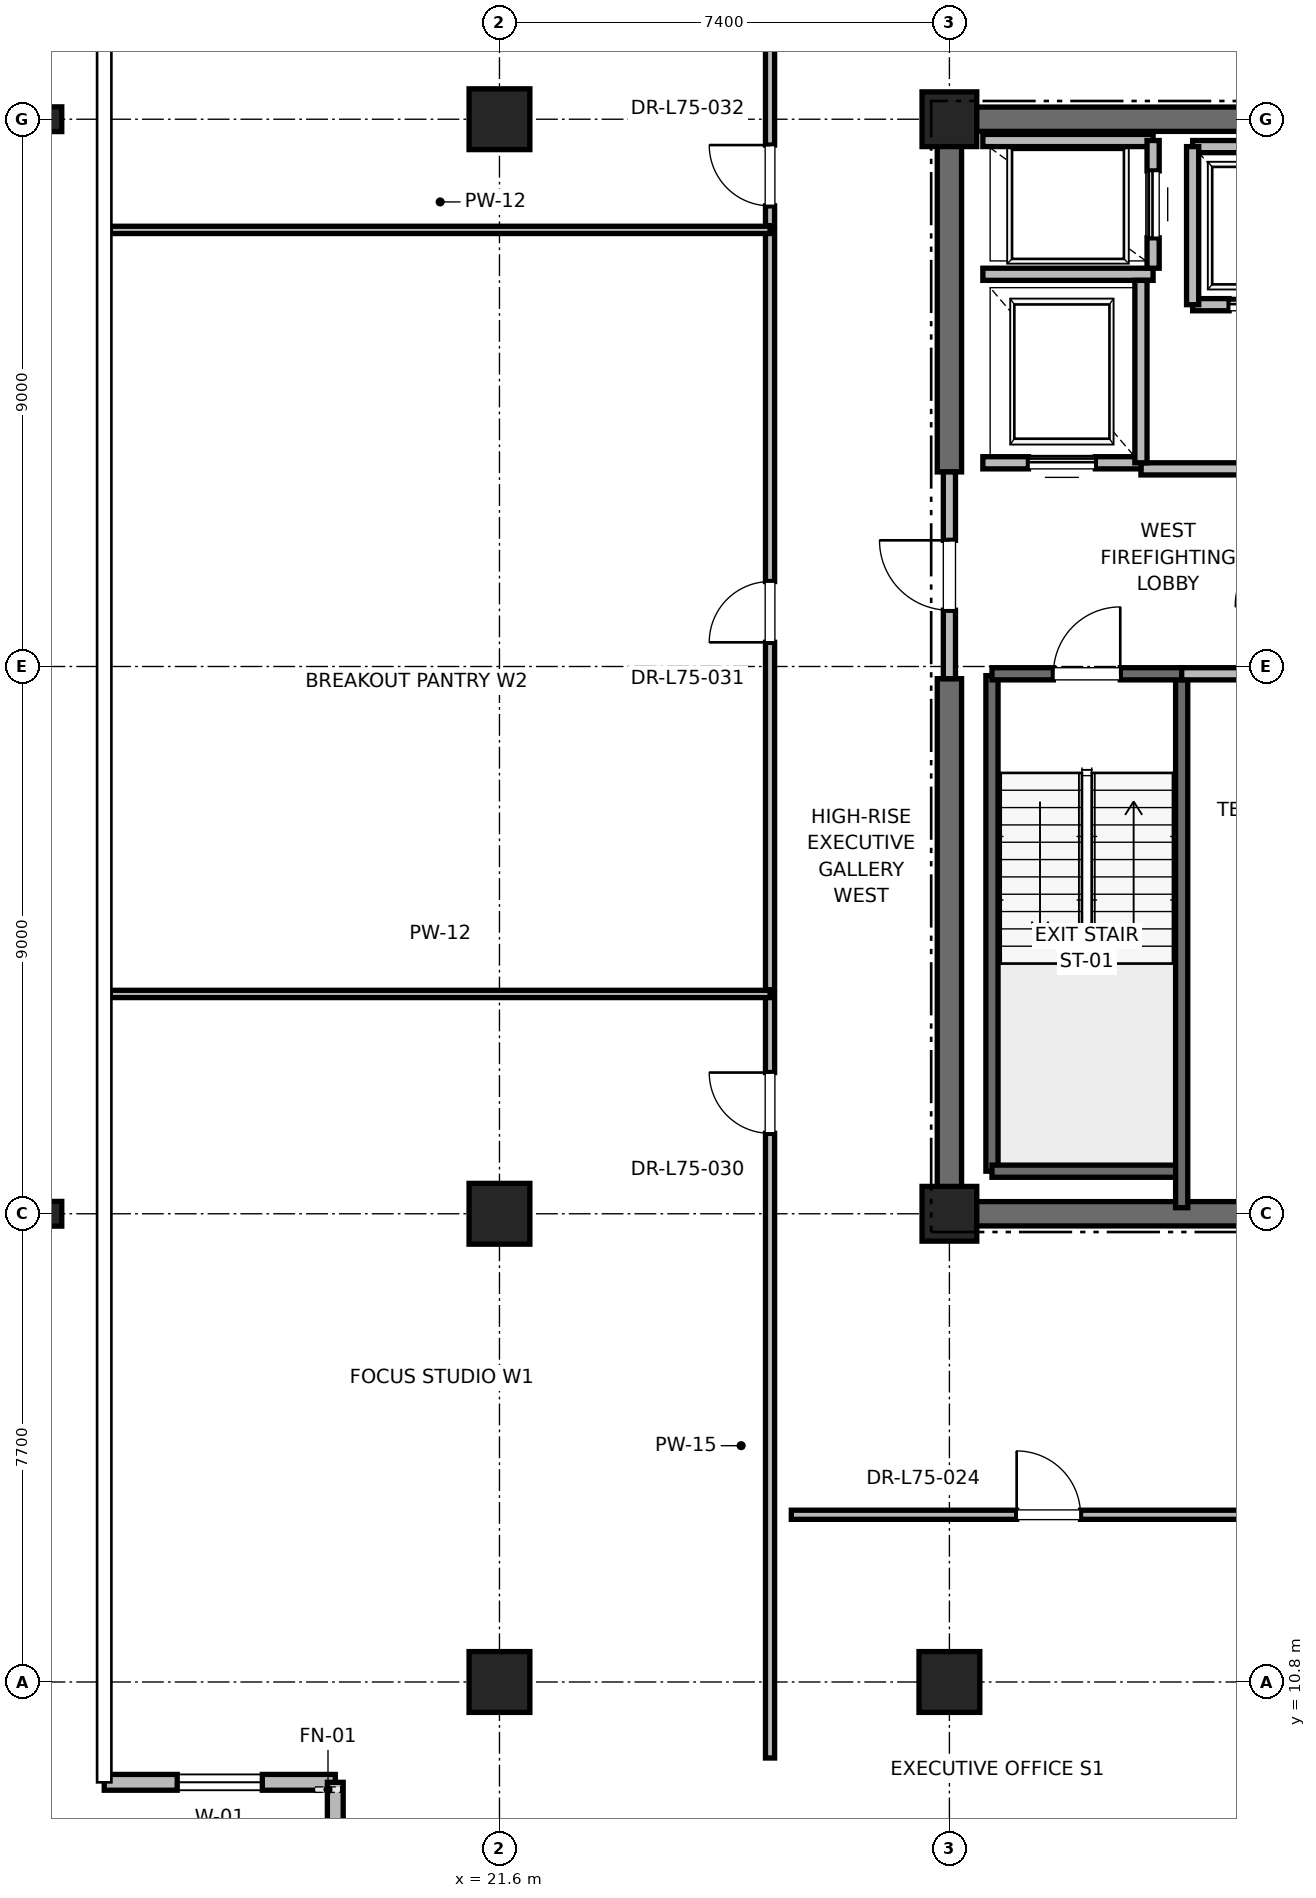
"""IFC4 building model, lengths in metres.
Left out: names, types, materials, properties, quantities, classifications, styles, units other than length and angle.
Written with IfcOpenShell. Run it as: python <this file> out.ifc"""

import sys

from ifc_helpers import new_model, si_unit, direction, frame, frame_2d, origin, origin_2d, place, context, subcontext, project, spatial, rectangle, i_section, extrude, element, fill, save


model = new_model("IFC4")
c1 = context("Model", 3, precision=1e-05, world=origin(), true_north=direction((0.0, 1.0)))
c2 = subcontext(c1, "Body", "Model", "MODEL_VIEW")
j1 = project(units=[si_unit("LENGTHUNIT", "METRE"), si_unit("PLANEANGLEUNIT", "RADIAN")], contexts=[c1])
p1 = place(None, origin())
s1 = spatial("IfcSite", under=j1, at=p1, CompositionType="ELEMENT")
p2 = place(p1, origin())
s2 = spatial("IfcBuilding", under=s1, at=p2, CompositionType="ELEMENT")
p3 = place(p2, frame((0.0, 0.0, 322.8)))
s3 = spatial("IfcBuildingStorey", under=s2, at=p3, CompositionType="ELEMENT", Elevation=322.8)
for number, where, z_axis, x_axis in (
    (1, (29.0, 10.8, 0.0), (0.0, 0.0, 1.0), (1.0, 0.0, 0.0)),
    (2, (21.6, 18.5, 0.0), (0.0, 0.0, 1.0), (1.0, 0.0, 0.0)),
    (3, (21.6, 36.5, 0.0), (0.0, 0.0, 1.0), (1.0, 0.0, 0.0)),
    (4, (21.6, 10.8, 0.0), (0.0, 0.0, 1.0), (1.0, 0.0, 0.0)),
):
    element("IfcColumn", number, at=place(p3, frame(where, z_axis=z_axis, x_axis=x_axis)), inside=s3, PredefinedType="COLUMN", context=c2, shape_type="SweptSolid", body=[
        extrude(rectangle(XDim=1.0, YDim=1.0, at=origin_2d()), origin(), (0.0, 0.0, 1.0), 4.0),
    ])
for number, where, z_axis, x_axis in (
    (5, (14.2, 18.5, 0.0), (0.0, 0.0, 1.0), (1.0, 0.0, 0.0)),
    (6, (14.2, 36.5, 0.0), (0.0, 0.0, 1.0), (1.0, 0.0, 0.0)),
):
    element("IfcColumn", number, at=place(p3, frame(where, z_axis=z_axis, x_axis=x_axis)), inside=s3, PredefinedType="COLUMN", context=c2, shape_type="SweptSolid", body=[
        extrude(i_section(OverallWidth=0.403, OverallDepth=0.406, WebThickness=0.027, FlangeThickness=0.043, FilletRadius=0.015, at=origin_2d()), origin(), (0.0, 0.0, 1.0), 4.0),
    ])
for number, where, z_axis, x_axis in (
    (7, (29.0, 18.5, 0.0), (0.0, 0.0, 1.0), (1.0, 0.0, 0.0)),
    (8, (29.0, 36.5, 0.0), (0.0, 0.0, 1.0), (1.0, 0.0, 0.0)),
):
    element("IfcColumn", number, at=place(p3, frame(where, z_axis=z_axis, x_axis=x_axis)), inside=s3, PredefinedType="PILASTER", context=c2, shape_type="SweptSolid", body=[
        extrude(rectangle(XDim=0.9, YDim=0.9, at=origin_2d()), origin(), (0.0, 0.0, 1.0), 4.0),
    ])
p4 = place(p3, frame((29.0, 18.5, 0.0), z_axis=(0.0, 0.0, 1.0), x_axis=(1.0, 0.0, 0.0)))
e9 = element("IfcWall", 9, at=p4, inside=s3, PredefinedType="SHEAR", context=c2, shape_type="SweptSolid", body=[
    extrude(rectangle(XDim=9.2, YDim=0.4, at=frame_2d((4.6, 0.0))), origin(), (0.0, 0.0, 1.0), 3.785),
])
p5 = place(p3, frame((29.0, 36.5, 0.0), z_axis=(0.0, 0.0, 1.0), x_axis=(1.0, 0.0, 0.0)))
e10 = element("IfcWall", 10, at=p5, inside=s3, PredefinedType="SHEAR", context=c2, shape_type="SweptSolid", body=[
    extrude(rectangle(XDim=5.8, YDim=0.4, at=frame_2d((2.9, 0.0))), origin(), (0.0, 0.0, 1.0), 3.785),
])
p6 = place(p3, frame((29.0, 18.5, 0.0), z_axis=(0.0, 0.0, 1.0), x_axis=(0.0, 1.0, 0.0)))
e11 = element("IfcWall", 11, at=p6, inside=s3, PredefinedType="SHEAR", context=c2, shape_type="SweptSolid", body=[
    extrude(rectangle(XDim=8.8, YDim=0.4, at=frame_2d((4.4, 0.0))), origin(), (0.0, 0.0, 1.0), 3.785),
])
p7 = place(p3, frame((29.0, 30.7, 0.0), z_axis=(0.0, 0.0, 1.0), x_axis=(0.0, 1.0, 0.0)))
e12 = element("IfcWall", 12, at=p7, inside=s3, PredefinedType="SHEAR", context=c2, shape_type="SweptSolid", body=[
    extrude(rectangle(XDim=5.8, YDim=0.4, at=frame_2d((2.9, 0.0))), origin(), (0.0, 0.0, 1.0), 3.785),
])
p8 = place(p3, frame((15.1, 9.15, 0.0), z_axis=(0.0, 0.0, 1.0), x_axis=(1.0, 0.0, 0.0)))
e13 = element("IfcWall", 13, at=p8, inside=s3, PredefinedType="PARAPET", context=c2, shape_type="SweptSolid", body=[
    extrude(rectangle(XDim=3.8, YDim=0.26, at=frame_2d((1.9, 0.0))), origin(), (0.0, 0.0, 1.0), 3.785),
])
p9 = place(p8, frame((1.2, 0.0, 0.85)))
e14 = element("IfcOpeningElement", 14, at=p9, cuts=e13, PredefinedType="OPENING", context=c2, shape_type="SweptSolid", body=[
    extrude(rectangle(XDim=1.4, YDim=2.0, at=frame_2d((0.7, 1.0))), frame((0.0, 0.13, 0.0), z_axis=(0.0, -1.0, 0.0), x_axis=(1.0, 0.0, 0.0)), (0.0, 0.0, 1.0), 0.26),
])
p10 = place(p3, frame((18.9, 9.15, 0.0), z_axis=(0.0, 0.0, 1.0), x_axis=(0.0, -1.0, 0.0)))
e15 = element("IfcWall", 15, at=p10, inside=s3, PredefinedType="PARAPET", context=c2, shape_type="SweptSolid", body=[
    extrude(rectangle(XDim=3.3, YDim=0.26, at=frame_2d((1.65, 0.0))), origin(), (0.0, 0.0, 1.0), 3.785),
])
p11 = place(p3, frame((29.7, 19.2, 0.0), z_axis=(0.0, 0.0, 1.0), x_axis=(0.0, 1.0, 0.0)))
e16 = element("IfcWall", 16, at=p11, inside=s3, PredefinedType="SOLIDWALL", context=c2, shape_type="SweptSolid", body=[
    extrude(rectangle(XDim=8.15, YDim=0.2, at=frame_2d((4.075, 0.0))), origin(), (0.0, 0.0, 1.0), 3.785),
])
p12 = place(p3, frame((29.7, 19.2, 0.0), z_axis=(0.0, 0.0, 1.0), x_axis=(1.0, 0.0, 0.0)))
e17 = element("IfcWall", 17, at=p12, inside=s3, PredefinedType="SOLIDWALL", context=c2, shape_type="SweptSolid", body=[
    extrude(rectangle(XDim=3.12, YDim=0.2, at=frame_2d((1.56, 0.0))), origin(), (0.0, 0.0, 1.0), 3.785),
])
p13 = place(p3, frame((32.82, 18.6, 0.0), z_axis=(0.0, 0.0, 1.0), x_axis=(0.0, 1.0, 0.0)))
e18 = element("IfcWall", 18, at=p13, inside=s3, PredefinedType="SOLIDWALL", context=c2, shape_type="SweptSolid", body=[
    extrude(rectangle(XDim=8.78, YDim=0.2, at=frame_2d((4.39, 0.0))), origin(), (0.0, 0.0, 1.0), 3.785),
])
p14 = place(p3, frame((29.7, 27.38, 0.0), z_axis=(0.0, 0.0, 1.0), x_axis=(1.0, 0.0, 0.0)))
e19 = element("IfcWall", 19, at=p14, inside=s3, PredefinedType="SOLIDWALL", context=c2, shape_type="SweptSolid", body=[
    extrude(rectangle(XDim=3.12, YDim=0.2, at=frame_2d((1.56, 0.0))), origin(), (0.0, 0.0, 1.0), 3.785),
])
p15 = place(p14, frame((1.01, 0.0, 0.0)))
e20 = element("IfcOpeningElement", 20, at=p15, cuts=e19, PredefinedType="OPENING", context=c2, shape_type="SweptSolid", body=[
    extrude(rectangle(XDim=1.1, YDim=2.15, at=frame_2d((0.55, 1.075))), frame((0.0, 0.1, 0.0), z_axis=(0.0, -1.0, 0.0), x_axis=(1.0, 0.0, 0.0)), (0.0, 0.0, 1.0), 0.2),
])
p16 = place(p3, frame((29.0, 27.3, 0.0), z_axis=(0.0, 0.0, 1.0), x_axis=(0.0, 1.0, 0.0)))
e21 = element("IfcWall", 21, at=p16, inside=s3, PredefinedType="PARTITIONING", context=c2, shape_type="SweptSolid", body=[
    extrude(rectangle(XDim=3.4, YDim=0.2, at=frame_2d((1.7, 0.0))), origin(), (0.0, 0.0, 1.0), 2.865),
])
p17 = place(p16, frame((1.125, 0.0, 0.0)))
e22 = element("IfcOpeningElement", 22, at=p17, cuts=e21, PredefinedType="OPENING", context=c2, shape_type="SweptSolid", body=[
    extrude(rectangle(XDim=1.15, YDim=2.2, at=frame_2d((0.575, 1.1))), frame((0.0, 0.1, 0.0), z_axis=(0.0, -1.0, 0.0), x_axis=(1.0, 0.0, 0.0)), (0.0, 0.0, 1.0), 0.2),
])
p18 = place(p3, frame((32.82, 27.38, 0.0), z_axis=(0.0, 0.0, 1.0), x_axis=(1.0, 0.0, 0.0)))
e23 = element("IfcWall", 23, at=p18, inside=s3, PredefinedType="PARTITIONING", context=c2, shape_type="SweptSolid", body=[
    extrude(rectangle(XDim=5.62, YDim=0.2, at=frame_2d((2.81, 0.0))), origin(), (0.0, 0.0, 1.0), 3.785),
])
p19 = place(p3, frame((32.15, 30.75, 0.0), z_axis=(0.0, 0.0, 1.0), x_axis=(1.0, 0.0, 0.0)))
e24 = element("IfcWall", 24, at=p19, inside=s3, PredefinedType="PARTITIONING", context=c2, shape_type="SweptSolid", body=[
    extrude(rectangle(XDim=2.7, YDim=0.2, at=frame_2d((1.35, 0.0))), origin(), (0.0, 0.0, 1.0), 3.785),
])
p20 = place(p3, frame((29.55, 30.85, 0.0), z_axis=(0.0, 0.0, 1.0), x_axis=(1.0, 0.0, 0.0)))
e25 = element("IfcWall", 25, at=p20, inside=s3, PredefinedType="SOLIDWALL", context=c2, shape_type="SweptSolid", body=[
    extrude(rectangle(XDim=2.6, YDim=0.2, at=frame_2d((1.3, 0.0))), origin(), (0.0, 0.0, 1.0), 2.865),
])
p21 = place(p20, frame((0.75, 0.0, 0.0)))
e26 = element("IfcOpeningElement", 26, at=p21, cuts=e25, PredefinedType="OPENING", context=c2, shape_type="SweptSolid", body=[
    extrude(rectangle(XDim=1.1, YDim=2.2, at=frame_2d((0.55, 1.1))), frame((0.0, 0.1, 0.0), z_axis=(0.0, -1.0, 0.0), x_axis=(1.0, 0.0, 0.0)), (0.0, 0.0, 1.0), 0.2),
])
p22 = place(p3, frame((29.55, 33.95, 0.0), z_axis=(0.0, 0.0, 1.0), x_axis=(1.0, 0.0, 0.0)))
e27 = element("IfcWall", 27, at=p22, inside=s3, PredefinedType="SOLIDWALL", context=c2, shape_type="SweptSolid", body=[
    extrude(rectangle(XDim=2.8, YDim=0.2, at=frame_2d((1.4, 0.0))), origin(), (0.0, 0.0, 1.0), 3.785),
])
p23 = place(p3, frame((32.15, 30.85, 0.0), z_axis=(0.0, 0.0, 1.0), x_axis=(0.0, 1.0, 0.0)))
e28 = element("IfcWall", 28, at=p23, inside=s3, PredefinedType="SOLIDWALL", context=c2, shape_type="SweptSolid", body=[
    extrude(rectangle(XDim=3.0, YDim=0.2, at=frame_2d((1.5, 0.0))), origin(), (0.0, 0.0, 1.0), 3.785),
])
p24 = place(p3, frame((32.35, 36.15, 0.0), z_axis=(0.0, 0.0, 1.0), x_axis=(-1.0, 0.0, 0.0)))
e29 = element("IfcWall", 29, at=p24, inside=s3, PredefinedType="SOLIDWALL", context=c2, shape_type="SweptSolid", body=[
    extrude(rectangle(XDim=2.8, YDim=0.2, at=frame_2d((1.4, 0.0))), origin(), (0.0, 0.0, 1.0), 3.22),
])
p25 = place(p3, frame((32.35, 34.05, 0.0), z_axis=(0.0, 0.0, 1.0), x_axis=(0.0, 1.0, 0.0)))
e30 = element("IfcWall", 30, at=p25, inside=s3, PredefinedType="SOLIDWALL", context=c2, shape_type="SweptSolid", body=[
    extrude(rectangle(XDim=2.1, YDim=0.2, at=frame_2d((1.05, 0.0))), origin(), (0.0, 0.0, 1.0), 3.785),
])
p26 = place(p25, frame((0.5, 0.0, 0.0)))
e31 = element("IfcOpeningElement", 31, at=p26, cuts=e30, PredefinedType="OPENING", context=c2, shape_type="SweptSolid", body=[
    extrude(rectangle(XDim=1.1, YDim=2.2, at=frame_2d((0.55, 1.1))), frame((0.0, 0.1, 0.0), z_axis=(0.0, -1.0, 0.0), x_axis=(1.0, 0.0, 0.0)), (0.0, 0.0, 1.0), 0.2),
])
p27 = place(p3, frame((33.0, 33.45, 0.0), z_axis=(0.0, 0.0, 1.0), x_axis=(1.0, 0.0, 0.0)))
e32 = element("IfcWall", 32, at=p27, inside=s3, PredefinedType="SOLIDWALL", context=c2, shape_type="SweptSolid", body=[
    extrude(rectangle(XDim=2.3, YDim=0.2, at=frame_2d((1.15, 0.0))), origin(), (0.0, 0.0, 1.0), 3.785),
])
p28 = place(p27, frame((0.6, 0.0, 0.0)))
e33 = element("IfcOpeningElement", 33, at=p28, cuts=e32, PredefinedType="OPENING", context=c2, shape_type="SweptSolid", body=[
    extrude(rectangle(XDim=1.1, YDim=2.2, at=frame_2d((0.55, 1.1))), frame((0.0, 0.1, 0.0), z_axis=(0.0, -1.0, 0.0), x_axis=(1.0, 0.0, 0.0)), (0.0, 0.0, 1.0), 0.2),
])
p29 = place(p3, frame((35.3, 36.05, 0.0), z_axis=(0.0, 0.0, 1.0), x_axis=(-1.0, 0.0, 0.0)))
e34 = element("IfcWall", 34, at=p29, inside=s3, PredefinedType="SOLIDWALL", context=c2, shape_type="SweptSolid", body=[
    extrude(rectangle(XDim=2.3, YDim=0.2, at=frame_2d((1.15, 0.0))), origin(), (0.0, 0.0, 1.0), 2.865),
])
p30 = place(p3, frame((33.0, 36.05, 0.0), z_axis=(0.0, 0.0, 1.0), x_axis=(0.0, -1.0, 0.0)))
e35 = element("IfcWall", 35, at=p30, inside=s3, PredefinedType="SOLIDWALL", context=c2, shape_type="SweptSolid", body=[
    extrude(rectangle(XDim=2.6, YDim=0.2, at=frame_2d((1.3, 0.0))), origin(), (0.0, 0.0, 1.0), 3.785),
])
p31 = place(p3, frame((26.4, 13.55, 0.0), z_axis=(0.0, 0.0, 1.0), x_axis=(1.0, 0.0, 0.0)))
e36 = element("IfcWall", 36, at=p31, inside=s3, PredefinedType="PARTITIONING", context=c2, shape_type="SweptSolid", body=[
    extrude(rectangle(XDim=8.432, YDim=0.15, at=frame_2d((4.216, 0.0))), origin(), (0.0, 0.0, 1.0), 2.85),
])
p32 = place(p31, frame((3.706, 0.0, 0.0)))
e37 = element("IfcOpeningElement", 37, at=p32, cuts=e36, PredefinedType="OPENING", context=c2, shape_type="SweptSolid", body=[
    extrude(rectangle(XDim=1.05, YDim=2.2, at=frame_2d((0.525, 1.1))), frame((0.0, 0.075, 0.0), z_axis=(0.0, -1.0, 0.0), x_axis=(1.0, 0.0, 0.0)), (0.0, 0.0, 1.0), 0.15),
])
p33 = place(p3, frame((26.05, 9.55, 0.0), z_axis=(0.0, 0.0, 1.0), x_axis=(0.0, 1.0, 0.0)))
e38 = element("IfcWall", 38, at=p33, inside=s3, PredefinedType="PARTITIONING", context=c2, shape_type="SweptSolid", body=[
    extrude(rectangle(XDim=12.565, YDim=0.15, at=frame_2d((6.282, 0.0))), origin(), (0.0, 0.0, 1.0), 2.85),
])
p34 = place(p33, frame((10.272, 0.0, 0.0)))
e39 = element("IfcOpeningElement", 39, at=p34, cuts=e38, PredefinedType="OPENING", context=c2, shape_type="SweptSolid", body=[
    extrude(rectangle(XDim=1.0, YDim=2.15, at=frame_2d((0.5, 1.075))), frame((0.0, 0.075, 0.0), z_axis=(0.0, -1.0, 0.0), x_axis=(1.0, 0.0, 0.0)), (0.0, 0.0, 1.0), 0.15),
])
p35 = place(p3, frame((15.2, 22.115, 0.0), z_axis=(0.0, 0.0, 1.0), x_axis=(1.0, 0.0, 0.0)))
e40 = element("IfcWall", 40, at=p35, inside=s3, PredefinedType="PARTITIONING", context=c2, shape_type="SweptSolid", body=[
    extrude(rectangle(XDim=10.85, YDim=0.12, at=frame_2d((5.425, 0.0))), origin(), (0.0, 0.0, 1.0), 2.85),
])
p36 = place(p3, frame((26.05, 22.185, 0.0), z_axis=(0.0, 0.0, 1.0), x_axis=(0.0, 1.0, 0.0)))
e41 = element("IfcWall", 41, at=p36, inside=s3, PredefinedType="PARTITIONING", context=c2, shape_type="SweptSolid", body=[
    extrude(rectangle(XDim=12.495, YDim=0.15, at=frame_2d((6.248, 0.0))), origin(), (0.0, 0.0, 1.0), 2.85),
])
p37 = place(p36, frame((5.712, 0.0, 0.0)))
e42 = element("IfcOpeningElement", 42, at=p37, cuts=e41, PredefinedType="OPENING", context=c2, shape_type="SweptSolid", body=[
    extrude(rectangle(XDim=1.0, YDim=2.15, at=frame_2d((0.5, 1.075))), frame((0.0, 0.075, 0.0), z_axis=(0.0, -1.0, 0.0), x_axis=(1.0, 0.0, 0.0)), (0.0, 0.0, 1.0), 0.15),
])
p38 = place(p3, frame((15.2, 34.68, 0.0), z_axis=(0.0, 0.0, 1.0), x_axis=(1.0, 0.0, 0.0)))
e43 = element("IfcWall", 43, at=p38, inside=s3, PredefinedType="PARTITIONING", context=c2, shape_type="SweptSolid", body=[
    extrude(rectangle(XDim=10.85, YDim=0.12, at=frame_2d((5.425, 0.0))), origin(), (0.0, 0.0, 1.0), 2.85),
])
p39 = place(p3, frame((26.05, 34.75, 0.0), z_axis=(0.0, 0.0, 1.0), x_axis=(0.0, 1.0, 0.0)))
e44 = element("IfcWall", 44, at=p39, inside=s3, PredefinedType="PARTITIONING", context=c2, shape_type="SweptSolid", body=[
    extrude(rectangle(XDim=10.7, YDim=0.15, at=frame_2d((5.35, 0.0))), origin(), (0.0, 0.0, 1.0), 2.85),
])
p40 = place(p39, frame((0.325, 0.0, 0.0)))
e45 = element("IfcOpeningElement", 45, at=p40, cuts=e44, PredefinedType="OPENING", context=c2, shape_type="SweptSolid", body=[
    extrude(rectangle(XDim=1.0, YDim=2.15, at=frame_2d((0.5, 1.075))), frame((0.0, 0.075, 0.0), z_axis=(0.0, -1.0, 0.0), x_axis=(1.0, 0.0, 0.0)), (0.0, 0.0, 1.0), 0.15),
])
p41 = place(p9, origin())
e46 = element("IfcWindow", 46, at=p41, inside=s3, PartitioningType="SINGLE_PANEL", PredefinedType="WINDOW", context=c2, shape_type="SweptSolid", body=[
    extrude(rectangle(XDim=1.4, YDim=2.0, at=frame_2d((0.7, 1.0))), frame((0.0, 0.03, 0.0), z_axis=(0.0, -1.0, 0.0), x_axis=(1.0, 0.0, 0.0)), (0.0, 0.0, 1.0), 0.06),
])
fill(e14, e46)
p42 = place(p15, origin())
e47 = element("IfcDoor", 47, at=p42, inside=s3, OperationType="SINGLE_SWING_RIGHT", PredefinedType="DOOR", context=c2, shape_type="SweptSolid", body=[
    extrude(rectangle(XDim=1.1, YDim=2.15, at=frame_2d((0.55, 1.075))), frame((0.0, 0.025, 0.0), z_axis=(0.0, -1.0, 0.0), x_axis=(1.0, 0.0, 0.0)), (0.0, 0.0, 1.0), 0.05),
])
fill(e20, e47)
p43 = place(p17, origin())
e48 = element("IfcDoor", 48, at=p43, inside=s3, OperationType="SINGLE_SWING_RIGHT", PredefinedType="DOOR", context=c2, shape_type="SweptSolid", body=[
    extrude(rectangle(XDim=1.15, YDim=2.2, at=frame_2d((0.575, 1.1))), frame((0.0, 0.025, 0.0), z_axis=(0.0, -1.0, 0.0), x_axis=(1.0, 0.0, 0.0)), (0.0, 0.0, 1.0), 0.05),
])
fill(e22, e48)
p44 = place(p21, origin())
e49 = element("IfcDoor", 49, at=p44, inside=s3, OperationType="SLIDING_TO_RIGHT", PredefinedType="DOOR", context=c2, shape_type="SweptSolid", body=[
    extrude(rectangle(XDim=1.1, YDim=2.2, at=frame_2d((0.55, 1.1))), frame((0.0, 0.025, 0.0), z_axis=(0.0, -1.0, 0.0), x_axis=(1.0, 0.0, 0.0)), (0.0, 0.0, 1.0), 0.05),
])
fill(e26, e49)
p45 = place(p26, origin())
e50 = element("IfcDoor", 50, at=p45, inside=s3, OperationType="SLIDING_TO_RIGHT", PredefinedType="DOOR", context=c2, shape_type="SweptSolid", body=[
    extrude(rectangle(XDim=1.1, YDim=2.2, at=frame_2d((0.55, 1.1))), frame((0.0, 0.025, 0.0), z_axis=(0.0, -1.0, 0.0), x_axis=(1.0, 0.0, 0.0)), (0.0, 0.0, 1.0), 0.05),
])
fill(e31, e50)
p46 = place(p28, origin())
e51 = element("IfcDoor", 51, at=p46, inside=s3, OperationType="SLIDING_TO_RIGHT", PredefinedType="DOOR", context=c2, shape_type="SweptSolid", body=[
    extrude(rectangle(XDim=1.1, YDim=2.2, at=frame_2d((0.55, 1.1))), frame((0.0, 0.025, 0.0), z_axis=(0.0, -1.0, 0.0), x_axis=(1.0, 0.0, 0.0)), (0.0, 0.0, 1.0), 0.05),
])
fill(e33, e51)
p47 = place(p32, origin())
e52 = element("IfcDoor", 52, at=p47, inside=s3, OperationType="SINGLE_SWING_LEFT", PredefinedType="DOOR", context=c2, shape_type="SweptSolid", body=[
    extrude(rectangle(XDim=1.05, YDim=2.2, at=frame_2d((0.525, 1.1))), frame((0.0, 0.025, 0.0), z_axis=(0.0, -1.0, 0.0), x_axis=(1.0, 0.0, 0.0)), (0.0, 0.0, 1.0), 0.05),
])
fill(e37, e52)
p48 = place(p34, origin())
e53 = element("IfcDoor", 53, at=p48, inside=s3, OperationType="SINGLE_SWING_RIGHT", PredefinedType="DOOR", context=c2, shape_type="SweptSolid", body=[
    extrude(rectangle(XDim=1.0, YDim=2.15, at=frame_2d((0.5, 1.075))), frame((0.0, 0.025, 0.0), z_axis=(0.0, -1.0, 0.0), x_axis=(1.0, 0.0, 0.0)), (0.0, 0.0, 1.0), 0.05),
])
fill(e39, e53)
p49 = place(p37, origin())
e54 = element("IfcDoor", 54, at=p49, inside=s3, OperationType="SINGLE_SWING_LEFT", PredefinedType="DOOR", context=c2, shape_type="SweptSolid", body=[
    extrude(rectangle(XDim=1.0, YDim=2.15, at=frame_2d((0.5, 1.075))), frame((0.0, 0.025, 0.0), z_axis=(0.0, -1.0, 0.0), x_axis=(1.0, 0.0, 0.0)), (0.0, 0.0, 1.0), 0.05),
])
fill(e42, e54)
p50 = place(p40, origin())
e55 = element("IfcDoor", 55, at=p50, inside=s3, OperationType="SINGLE_SWING_RIGHT", PredefinedType="DOOR", context=c2, shape_type="SweptSolid", body=[
    extrude(rectangle(XDim=1.0, YDim=2.15, at=frame_2d((0.5, 1.075))), frame((0.0, 0.025, 0.0), z_axis=(0.0, -1.0, 0.0), x_axis=(1.0, 0.0, 0.0)), (0.0, 0.0, 1.0), 0.05),
])
fill(e45, e55)
save(model, sys.argv[1])
